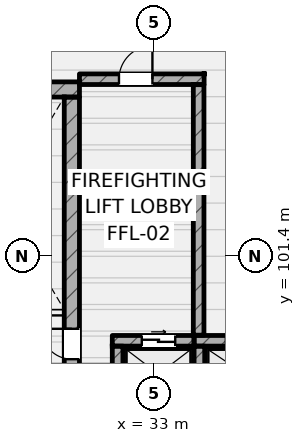
"""IFC4 building model, lengths in metres.
Left out: names, types, materials, properties, quantities, classifications, styles, units other than length and angle.
Written with IfcOpenShell. Run it as: python <this file> out.ifc"""

import sys

from ifc_helpers import new_model, si_unit, direction, frame, frame_2d, origin, place, context, subcontext, project, spatial, rectangle, extrude, element, fill, save


model = new_model("IFC4")
c1 = context("Model", 3, precision=1e-05, world=origin(), true_north=direction((0.0, 1.0)))
c2 = subcontext(c1, "Body", "Model", "MODEL_VIEW")
j1 = project(units=[si_unit("LENGTHUNIT", "METRE"), si_unit("PLANEANGLEUNIT", "RADIAN")], contexts=[c1])
p1 = place(None, origin())
s1 = spatial("IfcSite", under=j1, at=p1, CompositionType="ELEMENT")
p2 = place(p1, origin())
s2 = spatial("IfcBuilding", under=s1, at=p2, CompositionType="ELEMENT")
p3 = place(p2, frame((0.0, 0.0, 51.6)))
s3 = spatial("IfcBuildingStorey", under=s2, at=p3, CompositionType="ELEMENT", Elevation=51.6)
p4 = place(p3, frame((25.4, 106.862, 0.0), z_axis=(0.0, 0.0, 1.0), x_axis=(1.0, 0.0, 0.0)))
e1 = element("IfcWall", 1, at=p4, inside=s3, PredefinedType="SHEAR", context=c2, shape_type="SweptSolid", body=[
    extrude(rectangle(XDim=5.16, YDim=0.5, at=frame_2d((2.58, 0.0))), origin(), (0.0, 0.0, 1.0), 2.8),
])
p5 = place(p3, frame((30.31, 97.5, 0.0), z_axis=(0.0, 0.0, 1.0), x_axis=(0.0, 1.0, 0.0)))
e2 = element("IfcWall", 2, at=p5, inside=s3, PredefinedType="SHEAR", context=c2, shape_type="SweptSolid", body=[
    extrude(rectangle(XDim=9.112, YDim=0.5, at=frame_2d((4.556, 0.0))), origin(), (0.0, 0.0, 1.0), 2.8),
])
p6 = place(p5, frame((0.49, 0.0, 0.0)))
e3 = element("IfcOpeningElement", 3, at=p6, cuts=e2, PredefinedType="OPENING", context=c2, shape_type="SweptSolid", body=[
    extrude(rectangle(XDim=1.0, YDim=2.15, at=frame_2d((0.5, 1.075))), frame((0.0, 0.26, 0.0), z_axis=(0.0, -1.0, 0.0), x_axis=(1.0, 0.0, 0.0)), (0.0, 0.0, 1.0), 0.52),
])
p7 = place(p3, frame((31.64, 98.595, 0.0), z_axis=(0.0, 0.0, 1.0), x_axis=(1.0, 0.0, 0.0)))
e4 = element("IfcWall", 4, at=p7, inside=s3, PredefinedType="SHEAR", context=c2, shape_type="SweptSolid", body=[
    extrude(rectangle(XDim=2.69, YDim=0.35, at=frame_2d((1.345, 0.0))), origin(), (0.0, 0.0, 1.0), 3.6),
])
p8 = place(p7, frame((0.97, 0.0, 0.0)))
e5 = element("IfcOpeningElement", 5, at=p8, cuts=e4, PredefinedType="OPENING", context=c2, shape_type="SweptSolid", body=[
    extrude(rectangle(XDim=1.1, YDim=2.2, at=frame_2d((0.55, 1.1))), frame((0.0, 0.185, 0.0), z_axis=(0.0, -1.0, 0.0), x_axis=(1.0, 0.0, 0.0)), (0.0, 0.0, 1.0), 0.37),
])
p9 = place(p3, frame((31.815, 96.58, 0.0), z_axis=(0.0, 0.0, 1.0), x_axis=(0.0, 1.0, 0.0)))
e6 = element("IfcWall", 6, at=p9, inside=s3, PredefinedType="SHEAR", context=c2, shape_type="SweptSolid", body=[
    extrude(rectangle(XDim=1.84, YDim=0.35, at=frame_2d((0.92, 0.0))), origin(), (0.0, 0.0, 1.0), 3.6),
])
p10 = place(p3, frame((34.33, 98.595, 0.0), z_axis=(0.0, 0.0, 1.0), x_axis=(1.0, 0.0, 0.0)))
e7 = element("IfcWall", 7, at=p10, inside=s3, PredefinedType="SHEAR", context=c2, shape_type="SweptSolid", body=[
    extrude(rectangle(XDim=3.34, YDim=0.35, at=frame_2d((1.67, 0.0))), origin(), (0.0, 0.0, 1.0), 3.6),
])
p11 = place(p10, frame((1.045, 0.0, 0.0)))
e8 = element("IfcOpeningElement", 8, at=p11, cuts=e7, PredefinedType="OPENING", context=c2, shape_type="SweptSolid", body=[
    extrude(rectangle(XDim=1.25, YDim=2.25, at=frame_2d((0.625, 1.125))), frame((0.0, 0.185, 0.0), z_axis=(0.0, -1.0, 0.0), x_axis=(1.0, 0.0, 0.0)), (0.0, 0.0, 1.0), 0.37),
])
p12 = place(p3, frame((34.505, 96.58, 0.0), z_axis=(0.0, 0.0, 1.0), x_axis=(0.0, 1.0, 0.0)))
e9 = element("IfcWall", 9, at=p12, inside=s3, PredefinedType="SHEAR", context=c2, shape_type="SweptSolid", body=[
    extrude(rectangle(XDim=1.84, YDim=0.35, at=frame_2d((0.92, 0.0))), origin(), (0.0, 0.0, 1.0), 3.6),
])
p13 = place(p3, frame((34.48, 98.78, 0.0), z_axis=(0.0, 0.0, 1.0), x_axis=(0.0, 1.0, 0.0)))
e10 = element("IfcWall", 10, at=p13, inside=s3, PredefinedType="SHEAR", context=c2, shape_type="SweptSolid", body=[
    extrude(rectangle(XDim=8.24, YDim=0.35, at=frame_2d((4.12, 0.0))), origin(), (0.0, 0.0, 1.0), 2.6),
])
p14 = place(p3, frame((30.56, 107.2, 0.0), z_axis=(0.0, 0.0, 1.0), x_axis=(1.0, 0.0, 0.0)))
e11 = element("IfcWall", 11, at=p14, inside=s3, PredefinedType="SHEAR", context=c2, shape_type="SweptSolid", body=[
    extrude(rectangle(XDim=4.1, YDim=0.35, at=frame_2d((2.05, 0.0))), origin(), (0.0, 0.0, 1.0), 2.6),
])
p15 = place(p14, frame((1.3, 0.0, 0.0)))
e12 = element("IfcOpeningElement", 12, at=p15, cuts=e11, PredefinedType="OPENING", context=c2, shape_type="SweptSolid", body=[
    extrude(rectangle(XDim=1.1, YDim=2.2, at=frame_2d((0.55, 1.1))), frame((0.0, 0.185, 0.0), z_axis=(0.0, -1.0, 0.0), x_axis=(1.0, 0.0, 0.0)), (0.0, 0.0, 1.0), 0.37),
])
p16 = place(p6, origin())
e13 = element("IfcDoor", 13, at=p16, inside=s3, OperationType="SINGLE_SWING_RIGHT", PredefinedType="DOOR", context=c2, shape_type="SweptSolid", body=[
    extrude(rectangle(XDim=1.0, YDim=2.15, at=frame_2d((0.5, 1.075))), frame((0.0, 0.025, 0.0), z_axis=(0.0, -1.0, 0.0), x_axis=(1.0, 0.0, 0.0)), (0.0, 0.0, 1.0), 0.05),
])
fill(e3, e13)
p17 = place(p8, origin())
e14 = element("IfcDoor", 14, at=p17, inside=s3, OperationType="SLIDING_TO_LEFT", PredefinedType="DOOR", context=c2, shape_type="SweptSolid", body=[
    extrude(rectangle(XDim=1.1, YDim=2.2, at=frame_2d((0.55, 1.1))), frame((0.0, 0.025, 0.0), z_axis=(0.0, -1.0, 0.0), x_axis=(1.0, 0.0, 0.0)), (0.0, 0.0, 1.0), 0.05),
])
fill(e5, e14)
p18 = place(p15, origin())
e15 = element("IfcDoor", 15, at=p18, inside=s3, OperationType="SINGLE_SWING_RIGHT", PredefinedType="DOOR", context=c2, shape_type="SweptSolid", body=[
    extrude(rectangle(XDim=1.1, YDim=2.2, at=frame_2d((0.55, 1.1))), frame((0.0, 0.025, 0.0), z_axis=(0.0, -1.0, 0.0), x_axis=(1.0, 0.0, 0.0)), (0.0, 0.0, 1.0), 0.05),
])
fill(e12, e15)
save(model, sys.argv[1])
